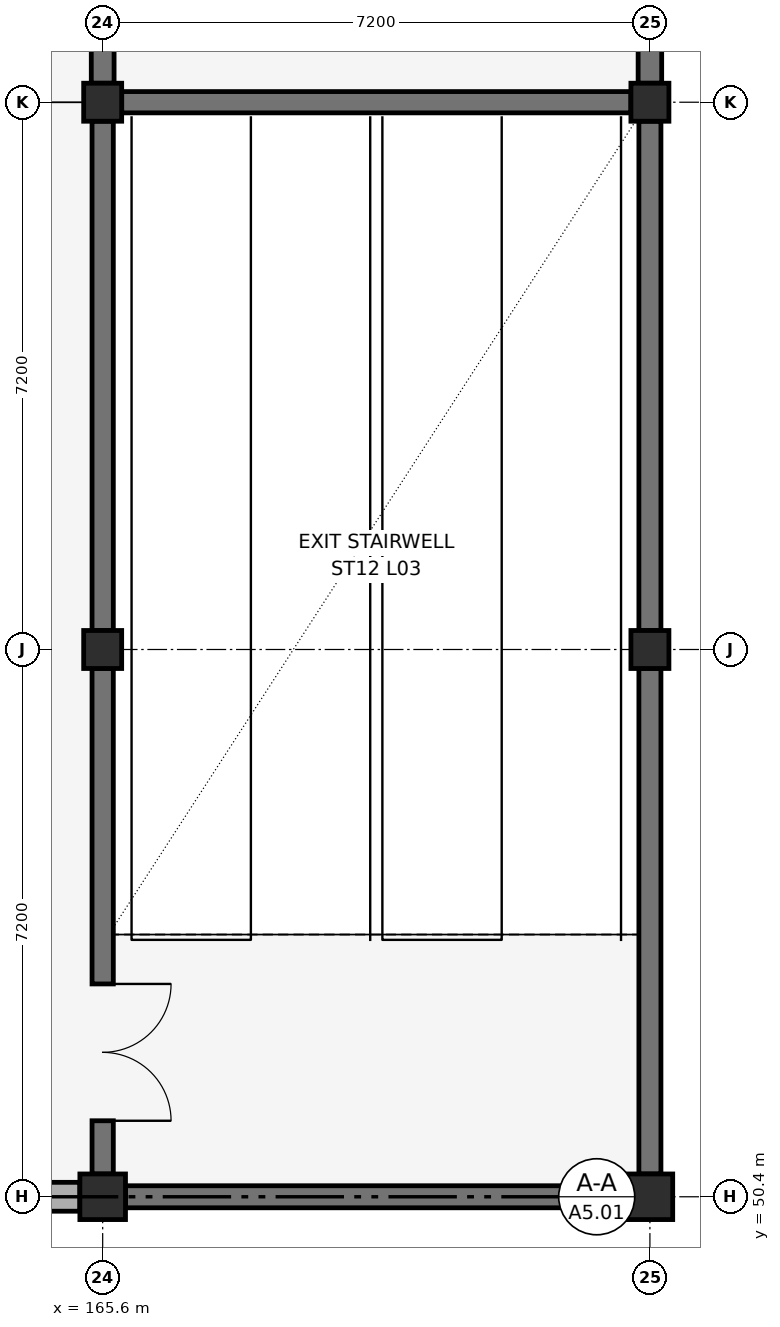
"""IFC4 building model, lengths in metres.
Left out: names, types, materials, properties, quantities, classifications, styles, units other than length and angle.
Written with IfcOpenShell. Run it as: python <this file> out.ifc"""

import sys

from ifc_helpers import new_model, si_unit, direction, frame, frame_2d, origin, origin_2d, place, context, subcontext, project, spatial, rectangle, extrude, element, fill, save


model = new_model("IFC4")
c1 = context("Model", 3, precision=1e-05, world=origin(), true_north=direction((0.0, 1.0)))
c2 = subcontext(c1, "Body", "Model", "MODEL_VIEW")
j1 = project(units=[si_unit("LENGTHUNIT", "METRE"), si_unit("PLANEANGLEUNIT", "RADIAN")], contexts=[c1])
p1 = place(None, origin())
s1 = spatial("IfcSite", under=j1, at=p1, CompositionType="ELEMENT")
p2 = place(p1, origin())
s2 = spatial("IfcBuilding", under=s1, at=p2, CompositionType="ELEMENT")
p3 = place(p2, frame((0.0, 0.0, 15.0)))
s3 = spatial("IfcBuildingStorey", under=s2, at=p3, CompositionType="ELEMENT", Elevation=15.0)
p4 = place(p3, frame((165.6, 50.4, 0.0), z_axis=(0.0, 0.0, 1.0), x_axis=(1.0, 0.0, 0.0)))
e1 = element("IfcColumn", 1, at=p4, inside=s3, PredefinedType="COLUMN", context=c2, shape_type="SweptSolid", body=[
    extrude(rectangle(XDim=0.6, YDim=0.6, at=origin_2d()), origin(), (0.0, 0.0, 1.0), 4.04),
])
for number, where, z_axis, x_axis in (
    (2, (165.6, 57.6, 0.0), (0.0, 0.0, 1.0), (1.0, 0.0, 0.0)),
    (3, (165.6, 64.8, 0.0), (0.0, 0.0, 1.0), (1.0, 0.0, 0.0)),
):
    element("IfcColumn", number, at=place(p3, frame(where, z_axis=z_axis, x_axis=x_axis)), inside=s3, PredefinedType="COLUMN", context=c2, shape_type="SweptSolid", body=[
        extrude(rectangle(XDim=0.5, YDim=0.5, at=origin_2d()), origin(), (0.0, 0.0, 1.0), 4.04),
    ])
p5 = place(p3, frame((172.8, 50.4, 0.0), z_axis=(0.0, 0.0, 1.0), x_axis=(1.0, 0.0, 0.0)))
e4 = element("IfcColumn", 4, at=p5, inside=s3, PredefinedType="COLUMN", context=c2, shape_type="SweptSolid", body=[
    extrude(rectangle(XDim=0.6, YDim=0.6, at=origin_2d()), origin(), (0.0, 0.0, 1.0), 4.04),
])
for number, where, z_axis, x_axis in (
    (5, (172.8, 57.6, 0.0), (0.0, 0.0, 1.0), (1.0, 0.0, 0.0)),
    (6, (172.8, 64.8, 0.0), (0.0, 0.0, 1.0), (1.0, 0.0, 0.0)),
):
    element("IfcColumn", number, at=place(p3, frame(where, z_axis=z_axis, x_axis=x_axis)), inside=s3, PredefinedType="COLUMN", context=c2, shape_type="SweptSolid", body=[
        extrude(rectangle(XDim=0.5, YDim=0.5, at=origin_2d()), origin(), (0.0, 0.0, 1.0), 4.04),
    ])
p6 = place(p3, frame((158.7, 50.4, 0.0), z_axis=(0.0, 0.0, 1.0), x_axis=(1.0, 0.0, 0.0)))
e7 = element("IfcWall", 7, at=p6, inside=s3, PredefinedType="SOLIDWALL", context=c2, shape_type="SweptSolid", body=[
    extrude(rectangle(XDim=6.6, YDim=0.38, at=frame_2d((3.3, 0.0))), origin(), (0.0, 0.0, 1.0), 3.65),
])
p7 = place(p6, frame((2.4, 0.0, 0.95)))
e8 = element("IfcOpeningElement", 8, at=p7, cuts=e7, PredefinedType="OPENING", context=c2, shape_type="SweptSolid", body=[
    extrude(rectangle(XDim=1.8, YDim=1.75, at=frame_2d((0.9, 0.875))), frame((0.0, 0.205, 0.0), z_axis=(0.0, -1.0, 0.0), x_axis=(1.0, 0.0, 0.0)), (0.0, 0.0, 1.0), 0.41),
])
p8 = place(p3, frame((165.9, 50.4, 0.0), z_axis=(0.0, 0.0, 1.0), x_axis=(1.0, 0.0, 0.0)))
e9 = element("IfcWall", 9, at=p8, inside=s3, PredefinedType="SHEAR", context=c2, shape_type="SweptSolid", body=[
    extrude(rectangle(XDim=6.6, YDim=0.29, at=frame_2d((3.3, 0.0))), origin(), (0.0, 0.0, 1.0), 3.96),
])
p9 = place(p3, frame((165.85, 64.8, 0.0), z_axis=(0.0, 0.0, 1.0), x_axis=(1.0, 0.0, 0.0)))
e10 = element("IfcWall", 10, at=p9, inside=s3, PredefinedType="SHEAR", context=c2, shape_type="SweptSolid", body=[
    extrude(rectangle(XDim=6.7, YDim=0.28, at=frame_2d((3.35, 0.0))), origin(), (0.0, 0.0, 1.0), 3.96),
])
p10 = place(p3, frame((165.6, 50.7, 0.0), z_axis=(0.0, 0.0, 1.0), x_axis=(0.0, 1.0, 0.0)))
e11 = element("IfcWall", 11, at=p10, inside=s3, PredefinedType="SHEAR", context=c2, shape_type="SweptSolid", body=[
    extrude(rectangle(XDim=6.65, YDim=0.28, at=frame_2d((3.325, 0.0))), origin(), (0.0, 0.0, 1.0), 3.96),
])
p11 = place(p10, frame((0.7, 0.0, 0.0)))
e12 = element("IfcOpeningElement", 12, at=p11, cuts=e11, PredefinedType="OPENING", context=c2, shape_type="SweptSolid", body=[
    extrude(rectangle(XDim=1.8, YDim=2.2, at=frame_2d((0.9, 1.1))), frame((0.0, 0.155, 0.0), z_axis=(0.0, -1.0, 0.0), x_axis=(1.0, 0.0, 0.0)), (0.0, 0.0, 1.0), 0.31),
])
p12 = place(p3, frame((165.6, 57.85, 0.0), z_axis=(0.0, 0.0, 1.0), x_axis=(0.0, 1.0, 0.0)))
e13 = element("IfcWall", 13, at=p12, inside=s3, PredefinedType="SHEAR", context=c2, shape_type="SweptSolid", body=[
    extrude(rectangle(XDim=6.7, YDim=0.28, at=frame_2d((3.35, 0.0))), origin(), (0.0, 0.0, 1.0), 3.96),
])
p13 = place(p3, frame((172.8, 50.7, 0.0), z_axis=(0.0, 0.0, 1.0), x_axis=(0.0, 1.0, 0.0)))
e14 = element("IfcWall", 14, at=p13, inside=s3, PredefinedType="SHEAR", context=c2, shape_type="SweptSolid", body=[
    extrude(rectangle(XDim=6.65, YDim=0.29, at=frame_2d((3.325, 0.0))), origin(), (0.0, 0.0, 1.0), 3.96),
])
p14 = place(p3, frame((172.8, 57.85, 0.0), z_axis=(0.0, 0.0, 1.0), x_axis=(0.0, 1.0, 0.0)))
e15 = element("IfcWall", 15, at=p14, inside=s3, PredefinedType="SHEAR", context=c2, shape_type="SweptSolid", body=[
    extrude(rectangle(XDim=6.7, YDim=0.29, at=frame_2d((3.35, 0.0))), origin(), (0.0, 0.0, 1.0), 3.96),
])
p15 = place(p3, frame((165.6, 65.05, 0.0), z_axis=(0.0, 0.0, 1.0), x_axis=(0.0, 1.0, 0.0)))
e16 = element("IfcWall", 16, at=p15, inside=s3, PredefinedType="SHEAR", context=c2, shape_type="SweptSolid", body=[
    extrude(rectangle(XDim=6.7, YDim=0.3, at=frame_2d((3.35, 0.0))), origin(), (0.0, 0.0, 1.0), 3.96),
])
p16 = place(p15, frame((0.75, 0.0, 0.0)))
e17 = element("IfcOpeningElement", 17, at=p16, cuts=e16, PredefinedType="OPENING", context=c2, shape_type="SweptSolid", body=[
    extrude(rectangle(XDim=1.8, YDim=2.2, at=frame_2d((0.9, 1.1))), frame((0.0, 0.165, 0.0), z_axis=(0.0, -1.0, 0.0), x_axis=(1.0, 0.0, 0.0)), (0.0, 0.0, 1.0), 0.33),
])
p17 = place(p3, frame((172.8, 65.05, 0.0), z_axis=(0.0, 0.0, 1.0), x_axis=(0.0, 1.0, 0.0)))
e18 = element("IfcWall", 18, at=p17, inside=s3, PredefinedType="SHEAR", context=c2, shape_type="SweptSolid", body=[
    extrude(rectangle(XDim=6.7, YDim=0.31, at=frame_2d((3.35, 0.0))), origin(), (0.0, 0.0, 1.0), 3.96),
])
p18 = place(p11, frame((1.8, 0.0, 0.0), z_axis=(0.0, 0.0, 1.0), x_axis=(-1.0, 0.0, 0.0)))
e19 = element("IfcDoor", 19, at=p18, inside=s3, OperationType="DOUBLE_SWING_LEFT", PredefinedType="DOOR", context=c2, shape_type="SweptSolid", body=[
    extrude(rectangle(XDim=1.8, YDim=2.2, at=frame_2d((0.9, 1.1))), frame((0.0, 0.025, 0.0), z_axis=(0.0, -1.0, 0.0), x_axis=(1.0, 0.0, 0.0)), (0.0, 0.0, 1.0), 0.05),
])
fill(e12, e19)
save(model, sys.argv[1])
